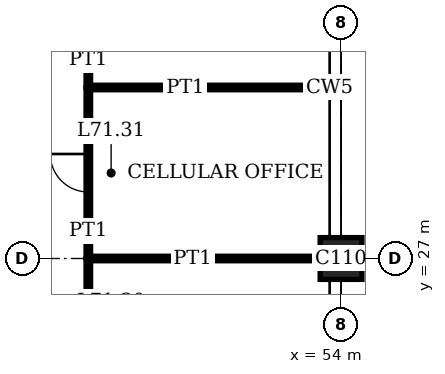
"""IFC4 building model, lengths in metres.
Left out: names, types, materials, properties, quantities, classifications, styles, units other than length and angle.
Written with IfcOpenShell. Run it as: python <this file> out.ifc"""

import sys

from ifc_helpers import new_model, si_unit, direction, frame, frame_2d, origin, origin_2d, place, context, subcontext, project, spatial, rectangle, extrude, element, fill, save


model = new_model("IFC4")
c1 = context("Model", 3, precision=1e-05, world=origin(), true_north=direction((0.0, 1.0)))
c2 = subcontext(c1, "Body", "Model", "MODEL_VIEW")
j1 = project(units=[si_unit("LENGTHUNIT", "METRE"), si_unit("PLANEANGLEUNIT", "RADIAN")], contexts=[c1])
p1 = place(None, origin())
s1 = spatial("IfcSite", under=j1, at=p1, CompositionType="ELEMENT")
p2 = place(p1, origin())
s2 = spatial("IfcBuilding", under=s1, at=p2, CompositionType="ELEMENT")
p3 = place(p2, frame((0.0, 0.0, 291.4)))
s3 = spatial("IfcBuildingStorey", under=s2, at=p3, CompositionType="ELEMENT", Elevation=291.4)
p4 = place(p3, frame((54.0, 27.0, 0.0), z_axis=(0.0, 0.0, 1.0), x_axis=(1.0, 0.0, 0.0)))
e1 = element("IfcColumn", 1, at=p4, inside=s3, PredefinedType="COLUMN", context=c2, shape_type="SweptSolid", body=[
    extrude(rectangle(XDim=1.1, YDim=1.1, at=origin_2d()), origin(), (0.0, 0.0, 1.0), 4.0),
])
p5 = place(p3, frame((47.35, 27.0, 0.0), z_axis=(0.0, 0.0, 1.0), x_axis=(1.0, 0.0, 0.0)))
e2 = element("IfcWall", 2, at=p5, inside=s3, PredefinedType="PARTITIONING", context=c2, shape_type="SweptSolid", body=[
    extrude(rectangle(XDim=6.1, YDim=0.12, at=frame_2d((3.05, 0.0))), origin(), (0.0, 0.0, 1.0), 3.05),
])
p6 = place(p3, frame((47.35, 31.5, 0.0), z_axis=(0.0, 0.0, 1.0), x_axis=(1.0, 0.0, 0.0)))
e3 = element("IfcWall", 3, at=p6, inside=s3, PredefinedType="PARTITIONING", context=c2, shape_type="SweptSolid", body=[
    extrude(rectangle(XDim=6.34, YDim=0.12, at=frame_2d((3.17, 0.0))), origin(), (0.0, 0.0, 1.0), 3.1),
])
p7 = place(p3, frame((47.35, 22.5, 0.0), z_axis=(0.0, 0.0, 1.0), x_axis=(0.0, 1.0, 0.0)))
e4 = element("IfcWall", 4, at=p7, inside=s3, PredefinedType="PARTITIONING", context=c2, shape_type="SweptSolid", body=[
    extrude(rectangle(XDim=4.5, YDim=0.12, at=frame_2d((2.25, 0.0))), origin(), (0.0, 0.0, 1.0), 3.75),
])
p8 = place(p7, frame((1.75, 0.0, 0.0)))
e5 = element("IfcOpeningElement", 5, at=p8, cuts=e4, PredefinedType="OPENING", context=c2, shape_type="SweptSolid", body=[
    extrude(rectangle(XDim=1.0, YDim=2.4, at=frame_2d((0.5, 1.2))), frame((0.0, 0.07, 0.0), z_axis=(0.0, -1.0, 0.0), x_axis=(1.0, 0.0, 0.0)), (0.0, 0.0, 1.0), 0.14),
])
p9 = place(p3, frame((47.35, 27.0, 0.0), z_axis=(0.0, 0.0, 1.0), x_axis=(0.0, 1.0, 0.0)))
e6 = element("IfcWall", 6, at=p9, inside=s3, PredefinedType="PARTITIONING", context=c2, shape_type="SweptSolid", body=[
    extrude(rectangle(XDim=4.5, YDim=0.12, at=frame_2d((2.25, 0.0))), origin(), (0.0, 0.0, 1.0), 3.75),
])
p10 = place(p9, frame((1.75, 0.0, 0.0)))
e7 = element("IfcOpeningElement", 7, at=p10, cuts=e6, PredefinedType="OPENING", context=c2, shape_type="SweptSolid", body=[
    extrude(rectangle(XDim=1.0, YDim=2.4, at=frame_2d((0.5, 1.2))), frame((0.0, 0.07, 0.0), z_axis=(0.0, -1.0, 0.0), x_axis=(1.0, 0.0, 0.0)), (0.0, 0.0, 1.0), 0.14),
])
p11 = place(p3, frame((47.35, 31.5, 0.0), z_axis=(0.0, 0.0, 1.0), x_axis=(0.0, 1.0, 0.0)))
e8 = element("IfcWall", 8, at=p11, inside=s3, PredefinedType="PARTITIONING", context=c2, shape_type="SweptSolid", body=[
    extrude(rectangle(XDim=4.5, YDim=0.12, at=frame_2d((2.25, 0.0))), origin(), (0.0, 0.0, 1.0), 3.75),
])
p12 = place(p11, frame((1.75, 0.0, 0.0)))
e9 = element("IfcOpeningElement", 9, at=p12, cuts=e8, PredefinedType="OPENING", context=c2, shape_type="SweptSolid", body=[
    extrude(rectangle(XDim=1.0, YDim=2.4, at=frame_2d((0.5, 1.2))), frame((0.0, 0.07, 0.0), z_axis=(0.0, -1.0, 0.0), x_axis=(1.0, 0.0, 0.0)), (0.0, 0.0, 1.0), 0.14),
])
p13 = place(p10, origin())
e10 = element("IfcDoor", 10, at=p13, inside=s3, OperationType="SINGLE_SWING_LEFT", PredefinedType="DOOR", context=c2, shape_type="SweptSolid", body=[
    extrude(rectangle(XDim=1.0, YDim=2.4, at=frame_2d((0.5, 1.2))), frame((0.0, 0.025, 0.0), z_axis=(0.0, -1.0, 0.0), x_axis=(1.0, 0.0, 0.0)), (0.0, 0.0, 1.0), 0.05),
])
fill(e7, e10)
save(model, sys.argv[1])
